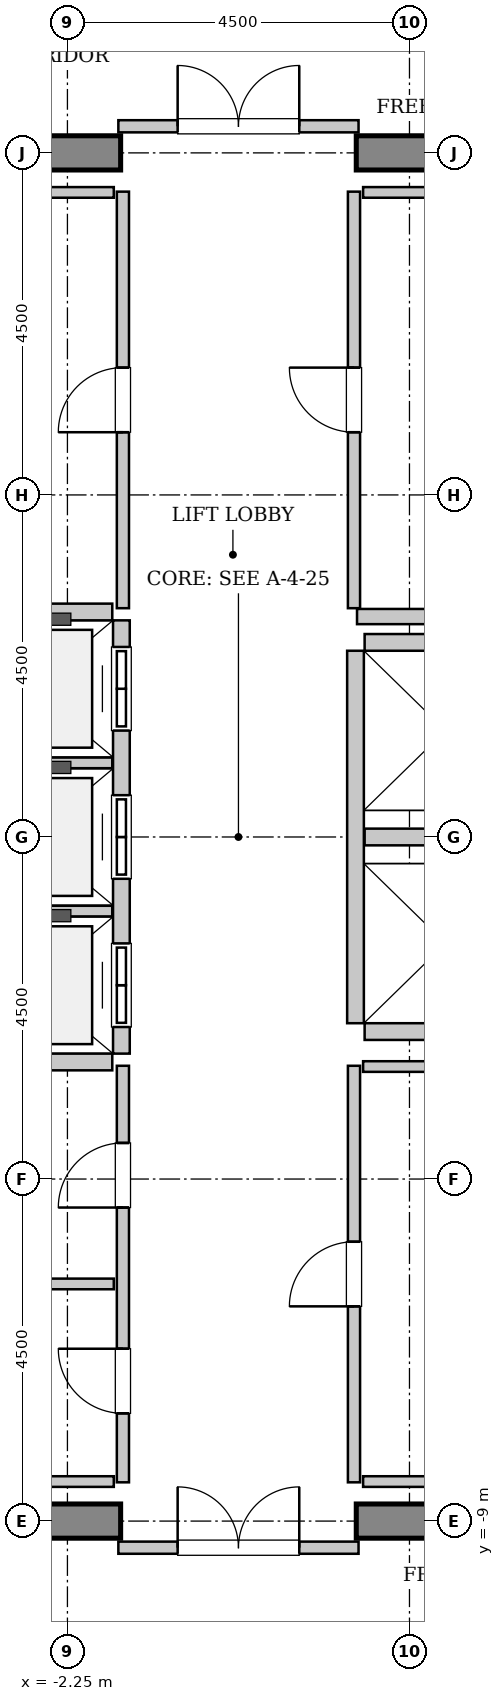
"""IFC4 building model, lengths in metres.
Left out: names, types, materials, properties, quantities, classifications, styles, units other than length and angle.
Written with IfcOpenShell. Run it as: python <this file> out.ifc"""

import sys

from ifc_helpers import new_model, si_unit, direction, frame, frame_2d, origin, place, context, subcontext, project, spatial, rectangle, extrude, source, transform, mapped, element, fill, save


model = new_model("IFC4")
c1 = context("Model", 3, precision=1e-05, world=origin(), true_north=direction((0.0, 1.0)))
c2 = subcontext(c1, "Body", "Model", "MODEL_VIEW")
j1 = project(units=[si_unit("LENGTHUNIT", "METRE"), si_unit("PLANEANGLEUNIT", "RADIAN")], contexts=[c1])
p1 = place(None, origin())
s1 = spatial("IfcSite", under=j1, at=p1, CompositionType="ELEMENT")
p2 = place(p1, origin())
s2 = spatial("IfcBuilding", under=s1, at=p2, CompositionType="ELEMENT")
p3 = place(p2, frame((0.0, 0.0, 306.4)))
s3 = spatial("IfcBuildingStorey", under=s2, at=p3, CompositionType="ELEMENT", Elevation=306.4)
m1 = source(origin(), c2, "Body", "SweptSolid", [
    extrude(rectangle(XDim=9.925, YDim=0.45, at=frame_2d((4.962, 0.0))), origin(), (0.0, 0.0, 1.0), 3.8),
])
for number, where, z_axis, x_axis in (
    (1, (-11.475, 9.0, 0.0), (0.0, 0.0, 1.0), (1.0, 0.0, 0.0)),
    (2, (1.55, 9.0, 0.0), (0.0, 0.0, 1.0), (1.0, 0.0, 0.0)),
    (3, (-11.475, -9.0, 0.0), (0.0, 0.0, 1.0), (1.0, 0.0, 0.0)),
    (4, (1.55, -9.0, 0.0), (0.0, 0.0, 1.0), (1.0, 0.0, 0.0)),
):
    element("IfcWall", number, at=place(p3, frame(where, z_axis=z_axis, x_axis=x_axis)), inside=s3, PredefinedType="SHEAR", context=c2, shape_type="MappedRepresentation", body=[
        mapped(m1, transform((0.0, 0.0, 0.0), x_axis=(1.0, 0.0, 0.0), y_axis=(0.0, 1.0, 0.0), z_axis=(0.0, 0.0, 1.0), scale=1.0)),
    ])
m2 = source(origin(), c2, "Body", "SweptSolid", [
    extrude(rectangle(XDim=5.7, YDim=0.22, at=frame_2d((2.85, 0.0))), origin(), (0.0, 0.0, 1.0), 3.535),
])
p4 = place(p3, frame((-1.54, -2.85, 0.0), z_axis=(0.0, 0.0, 1.0), x_axis=(0.0, 1.0, 0.0)))
e5 = element("IfcWall", 5, at=p4, inside=s3, PredefinedType="SOLIDWALL", context=c2, shape_type="MappedRepresentation", body=[
    mapped(m2, transform((0.0, 0.0, 0.0), x_axis=(1.0, 0.0, 0.0), y_axis=(0.0, 1.0, 0.0), z_axis=(0.0, 0.0, 1.0), scale=1.0)),
])
p5 = place(p4, frame((0.35, 0.0, 0.0)))
e6 = element("IfcOpeningElement", 6, at=p5, cuts=e5, PredefinedType="OPENING", context=c2, shape_type="SweptSolid", body=[
    extrude(rectangle(XDim=1.1, YDim=2.2, at=frame_2d((0.55, 1.1))), frame((0.0, 0.12, 0.0), z_axis=(0.0, -1.0, 0.0), x_axis=(1.0, 0.0, 0.0)), (0.0, 0.0, 1.0), 0.24),
])
p6 = place(p4, frame((2.3, 0.0, 0.0)))
e7 = element("IfcOpeningElement", 7, at=p6, cuts=e5, PredefinedType="OPENING", context=c2, shape_type="SweptSolid", body=[
    extrude(rectangle(XDim=1.1, YDim=2.2, at=frame_2d((0.55, 1.1))), frame((0.0, 0.12, 0.0), z_axis=(0.0, -1.0, 0.0), x_axis=(1.0, 0.0, 0.0)), (0.0, 0.0, 1.0), 0.24),
])
p7 = place(p4, frame((4.25, 0.0, 0.0)))
e8 = element("IfcOpeningElement", 8, at=p7, cuts=e5, PredefinedType="OPENING", context=c2, shape_type="SweptSolid", body=[
    extrude(rectangle(XDim=1.1, YDim=2.2, at=frame_2d((0.55, 1.1))), frame((0.0, 0.12, 0.0), z_axis=(0.0, -1.0, 0.0), x_axis=(1.0, 0.0, 0.0)), (0.0, 0.0, 1.0), 0.24),
])
m3 = source(origin(), c2, "Body", "SweptSolid", [
    extrude(rectangle(XDim=2.13, YDim=0.22, at=frame_2d((1.065, 0.0))), origin(), (0.0, 0.0, 1.0), 3.535),
])
p8 = place(p3, frame((-3.79, -2.96, 0.0), z_axis=(0.0, 0.0, 1.0), x_axis=(1.0, 0.0, 0.0)))
e9 = element("IfcWall", 9, at=p8, inside=s3, PredefinedType="SOLIDWALL", context=c2, shape_type="MappedRepresentation", body=[
    mapped(m3, transform((0.0, 0.0, 0.0), x_axis=(1.0, 0.0, 0.0), y_axis=(0.0, 1.0, 0.0), z_axis=(0.0, 0.0, 1.0), scale=1.0)),
])
m4 = source(origin(), c2, "Body", "SweptSolid", [
    extrude(rectangle(XDim=2.13, YDim=0.14, at=frame_2d((1.065, 0.0))), origin(), (0.0, 0.0, 1.0), 3.535),
])
for number, where, z_axis, x_axis in (
    (10, (-3.79, -0.975, 0.0), (0.0, 0.0, 1.0), (1.0, 0.0, 0.0)),
    (11, (-3.79, 0.975, 0.0), (0.0, 0.0, 1.0), (1.0, 0.0, 0.0)),
):
    element("IfcWall", number, at=place(p3, frame(where, z_axis=z_axis, x_axis=x_axis)), inside=s3, PredefinedType="PARTITIONING", context=c2, shape_type="MappedRepresentation", body=[
        mapped(m4, transform((0.0, 0.0, 0.0), x_axis=(1.0, 0.0, 0.0), y_axis=(0.0, 1.0, 0.0), z_axis=(0.0, 0.0, 1.0), scale=1.0)),
    ])
p9 = place(p3, frame((-1.66, 2.96, 0.0), z_axis=(0.0, 0.0, 1.0), x_axis=(-1.0, 0.0, 0.0)))
e12 = element("IfcWall", 12, at=p9, inside=s3, PredefinedType="SOLIDWALL", context=c2, shape_type="MappedRepresentation", body=[
    mapped(m3, transform((0.0, 0.0, 0.0), x_axis=(1.0, 0.0, 0.0), y_axis=(0.0, 1.0, 0.0), z_axis=(0.0, 0.0, 1.0), scale=1.0)),
])
m5 = source(origin(), c2, "Body", "SweptSolid", [
    extrude(rectangle(XDim=4.9, YDim=0.22, at=frame_2d((2.45, 0.0))), origin(), (0.0, 0.0, 1.0), 3.535),
])
p10 = place(p3, frame((1.54, 2.45, 0.0), z_axis=(0.0, 0.0, 1.0), x_axis=(0.0, -1.0, 0.0)))
e13 = element("IfcWall", 13, at=p10, inside=s3, PredefinedType="SOLIDWALL", context=c2, shape_type="MappedRepresentation", body=[
    mapped(m5, transform((0.0, 0.0, 0.0), x_axis=(1.0, 0.0, 0.0), y_axis=(0.0, 1.0, 0.0), z_axis=(0.0, 0.0, 1.0), scale=1.0)),
])
for number, where, z_axis, x_axis in (
    (14, (1.66, -2.56, 0.0), (0.0, 0.0, 1.0), (1.0, 0.0, 0.0)),
    (15, (1.66, 0.0, 0.0), (0.0, 0.0, 1.0), (1.0, 0.0, 0.0)),
    (16, (3.79, 2.56, 0.0), (0.0, 0.0, 1.0), (-1.0, 0.0, 0.0)),
):
    element("IfcWall", number, at=place(p3, frame(where, z_axis=z_axis, x_axis=x_axis)), inside=s3, PredefinedType="SOLIDWALL", context=c2, shape_type="MappedRepresentation", body=[
        mapped(m3, transform((0.0, 0.0, 0.0), x_axis=(1.0, 0.0, 0.0), y_axis=(0.0, 1.0, 0.0), z_axis=(0.0, 0.0, 1.0), scale=1.0)),
    ])
m6 = source(origin(), c2, "Body", "SweptSolid", [
    extrude(rectangle(XDim=2.52, YDim=0.2, at=frame_2d((1.26, 0.0))), origin(), (0.0, 0.0, 1.0), 3.535),
])
p11 = place(p3, frame((1.56, 2.9, 0.0), z_axis=(0.0, 0.0, 1.0), x_axis=(1.0, 0.0, 0.0)))
e17 = element("IfcWall", 17, at=p11, inside=s3, PredefinedType="PARTITIONING", context=c2, shape_type="MappedRepresentation", body=[
    mapped(m6, transform((0.0, 0.0, 0.0), x_axis=(1.0, 0.0, 0.0), y_axis=(0.0, 1.0, 0.0), z_axis=(0.0, 0.0, 1.0), scale=1.0)),
])
m7 = source(origin(), c2, "Body", "SweptSolid", [
    extrude(rectangle(XDim=3.16, YDim=0.16, at=frame_2d((1.58, 0.0))), origin(), (0.0, 0.0, 1.0), 2.625),
])
p12 = place(p3, frame((-1.58, 9.35, 0.0), z_axis=(0.0, 0.0, 1.0), x_axis=(1.0, 0.0, 0.0)))
e18 = element("IfcWall", 18, at=p12, inside=s3, PredefinedType="PARTITIONING", context=c2, shape_type="MappedRepresentation", body=[
    mapped(m7, transform((0.0, 0.0, 0.0), x_axis=(1.0, 0.0, 0.0), y_axis=(0.0, 1.0, 0.0), z_axis=(0.0, 0.0, 1.0), scale=1.0)),
])
p13 = place(p12, frame((0.78, 0.0, 0.0)))
e19 = element("IfcOpeningElement", 19, at=p13, cuts=e18, PredefinedType="OPENING", context=c2, shape_type="SweptSolid", body=[
    extrude(rectangle(XDim=1.6, YDim=2.3, at=frame_2d((0.8, 1.15))), frame((0.0, 0.09, 0.0), z_axis=(0.0, -1.0, 0.0), x_axis=(1.0, 0.0, 0.0)), (0.0, 0.0, 1.0), 0.18),
])
p14 = place(p3, frame((-1.58, -9.35, 0.0), z_axis=(0.0, 0.0, 1.0), x_axis=(1.0, 0.0, 0.0)))
e20 = element("IfcWall", 20, at=p14, inside=s3, PredefinedType="PARTITIONING", context=c2, shape_type="MappedRepresentation", body=[
    mapped(m7, transform((0.0, 0.0, 0.0), x_axis=(1.0, 0.0, 0.0), y_axis=(0.0, 1.0, 0.0), z_axis=(0.0, 0.0, 1.0), scale=1.0)),
])
p15 = place(p14, frame((0.78, 0.0, 0.0)))
e21 = element("IfcOpeningElement", 21, at=p15, cuts=e20, PredefinedType="OPENING", context=c2, shape_type="SweptSolid", body=[
    extrude(rectangle(XDim=1.6, YDim=2.3, at=frame_2d((0.8, 1.15))), frame((0.0, 0.09, 0.0), z_axis=(0.0, -1.0, 0.0), x_axis=(1.0, 0.0, 0.0)), (0.0, 0.0, 1.0), 0.18),
])
m8 = source(origin(), c2, "Body", "SweptSolid", [
    extrude(rectangle(XDim=5.48, YDim=0.16, at=frame_2d((2.74, 0.0))), origin(), (0.0, 0.0, 1.0), 3.535),
])
p16 = place(p3, frame((-1.52, 3.01, 0.0), z_axis=(0.0, 0.0, 1.0), x_axis=(0.0, 1.0, 0.0)))
e22 = element("IfcWall", 22, at=p16, inside=s3, PredefinedType="PARTITIONING", context=c2, shape_type="MappedRepresentation", body=[
    mapped(m8, transform((0.0, 0.0, 0.0), x_axis=(1.0, 0.0, 0.0), y_axis=(0.0, 1.0, 0.0), z_axis=(0.0, 0.0, 1.0), scale=1.0)),
])
p17 = place(p16, frame((2.315, 0.0, 0.0)))
e23 = element("IfcOpeningElement", 23, at=p17, cuts=e22, PredefinedType="OPENING", context=c2, shape_type="SweptSolid", body=[
    extrude(rectangle(XDim=0.85, YDim=2.1, at=frame_2d((0.425, 1.05))), frame((0.0, 0.09, 0.0), z_axis=(0.0, -1.0, 0.0), x_axis=(1.0, 0.0, 0.0)), (0.0, 0.0, 1.0), 0.18),
])
m9 = source(origin(), c2, "Body", "SweptSolid", [
    extrude(rectangle(XDim=3.15, YDim=0.14, at=frame_2d((1.575, 0.0))), origin(), (0.0, 0.0, 1.0), 3.535),
])
p18 = place(p3, frame((-4.79, 8.48, 0.0), z_axis=(0.0, 0.0, 1.0), x_axis=(1.0, 0.0, 0.0)))
e24 = element("IfcWall", 24, at=p18, inside=s3, PredefinedType="PARTITIONING", context=c2, shape_type="MappedRepresentation", body=[
    mapped(m9, transform((0.0, 0.0, 0.0), x_axis=(1.0, 0.0, 0.0), y_axis=(0.0, 1.0, 0.0), z_axis=(0.0, 0.0, 1.0), scale=1.0)),
])
p19 = place(p3, frame((-1.52, -8.49, 0.0), z_axis=(0.0, 0.0, 1.0), x_axis=(0.0, 1.0, 0.0)))
e25 = element("IfcWall", 25, at=p19, inside=s3, PredefinedType="PARTITIONING", context=c2, shape_type="MappedRepresentation", body=[
    mapped(m8, transform((0.0, 0.0, 0.0), x_axis=(1.0, 0.0, 0.0), y_axis=(0.0, 1.0, 0.0), z_axis=(0.0, 0.0, 1.0), scale=1.0)),
])
p20 = place(p19, frame((0.907, 0.0, 0.0)))
e26 = element("IfcOpeningElement", 26, at=p20, cuts=e25, PredefinedType="OPENING", context=c2, shape_type="SweptSolid", body=[
    extrude(rectangle(XDim=0.85, YDim=2.1, at=frame_2d((0.425, 1.05))), frame((0.0, 0.09, 0.0), z_axis=(0.0, -1.0, 0.0), x_axis=(1.0, 0.0, 0.0)), (0.0, 0.0, 1.0), 0.18),
])
p21 = place(p19, frame((3.615, 0.0, 0.0)))
e27 = element("IfcOpeningElement", 27, at=p21, cuts=e25, PredefinedType="OPENING", context=c2, shape_type="SweptSolid", body=[
    extrude(rectangle(XDim=0.85, YDim=2.1, at=frame_2d((0.425, 1.05))), frame((0.0, 0.09, 0.0), z_axis=(0.0, -1.0, 0.0), x_axis=(1.0, 0.0, 0.0)), (0.0, 0.0, 1.0), 0.18),
])
m10 = source(origin(), c2, "Body", "SweptSolid", [
    extrude(rectangle(XDim=5.55, YDim=0.14, at=frame_2d((2.775, 0.0))), origin(), (0.0, 0.0, 1.0), 3.535),
])
p22 = place(p3, frame((-7.19, -5.88, 0.0), z_axis=(0.0, 0.0, 1.0), x_axis=(1.0, 0.0, 0.0)))
e28 = element("IfcWall", 28, at=p22, inside=s3, PredefinedType="PARTITIONING", context=c2, shape_type="MappedRepresentation", body=[
    mapped(m10, transform((0.0, 0.0, 0.0), x_axis=(1.0, 0.0, 0.0), y_axis=(0.0, 1.0, 0.0), z_axis=(0.0, 0.0, 1.0), scale=1.0)),
])
p23 = place(p3, frame((1.52, 3.01, 0.0), z_axis=(0.0, 0.0, 1.0), x_axis=(0.0, 1.0, 0.0)))
e29 = element("IfcWall", 29, at=p23, inside=s3, PredefinedType="PARTITIONING", context=c2, shape_type="MappedRepresentation", body=[
    mapped(m8, transform((0.0, 0.0, 0.0), x_axis=(1.0, 0.0, 0.0), y_axis=(0.0, 1.0, 0.0), z_axis=(0.0, 0.0, 1.0), scale=1.0)),
])
p24 = place(p23, frame((2.315, 0.0, 0.0)))
e30 = element("IfcOpeningElement", 30, at=p24, cuts=e29, PredefinedType="OPENING", context=c2, shape_type="SweptSolid", body=[
    extrude(rectangle(XDim=0.85, YDim=2.1, at=frame_2d((0.425, 1.05))), frame((0.0, 0.09, 0.0), z_axis=(0.0, -1.0, 0.0), x_axis=(1.0, 0.0, 0.0)), (0.0, 0.0, 1.0), 0.18),
])
for number, where, z_axis, x_axis in (
    (31, (1.64, 8.48, 0.0), (0.0, 0.0, 1.0), (1.0, 0.0, 0.0)),
    (32, (-4.79, -8.48, 0.0), (0.0, 0.0, 1.0), (1.0, 0.0, 0.0)),
):
    element("IfcWall", number, at=place(p3, frame(where, z_axis=z_axis, x_axis=x_axis)), inside=s3, PredefinedType="PARTITIONING", context=c2, shape_type="MappedRepresentation", body=[
        mapped(m9, transform((0.0, 0.0, 0.0), x_axis=(1.0, 0.0, 0.0), y_axis=(0.0, 1.0, 0.0), z_axis=(0.0, 0.0, 1.0), scale=1.0)),
    ])
p25 = place(p3, frame((1.52, -8.49, 0.0), z_axis=(0.0, 0.0, 1.0), x_axis=(0.0, 1.0, 0.0)))
e33 = element("IfcWall", 33, at=p25, inside=s3, PredefinedType="PARTITIONING", context=c2, shape_type="MappedRepresentation", body=[
    mapped(m8, transform((0.0, 0.0, 0.0), x_axis=(1.0, 0.0, 0.0), y_axis=(0.0, 1.0, 0.0), z_axis=(0.0, 0.0, 1.0), scale=1.0)),
])
p26 = place(p25, frame((2.315, 0.0, 0.0)))
e34 = element("IfcOpeningElement", 34, at=p26, cuts=e33, PredefinedType="OPENING", context=c2, shape_type="SweptSolid", body=[
    extrude(rectangle(XDim=0.85, YDim=2.1, at=frame_2d((0.425, 1.05))), frame((0.0, 0.09, 0.0), z_axis=(0.0, -1.0, 0.0), x_axis=(1.0, 0.0, 0.0)), (0.0, 0.0, 1.0), 0.18),
])
for number, where, z_axis, x_axis in (
    (35, (1.64, -3.02, 0.0), (0.0, 0.0, 1.0), (1.0, 0.0, 0.0)),
    (36, (1.64, -8.48, 0.0), (0.0, 0.0, 1.0), (1.0, 0.0, 0.0)),
):
    element("IfcWall", number, at=place(p3, frame(where, z_axis=z_axis, x_axis=x_axis)), inside=s3, PredefinedType="PARTITIONING", context=c2, shape_type="MappedRepresentation", body=[
        mapped(m9, transform((0.0, 0.0, 0.0), x_axis=(1.0, 0.0, 0.0), y_axis=(0.0, 1.0, 0.0), z_axis=(0.0, 0.0, 1.0), scale=1.0)),
    ])
m11 = source(origin(), c2, "Body", "SweptSolid", [
    extrude(rectangle(XDim=1.1, YDim=2.2, at=frame_2d((0.55, 1.1))), frame((0.0, 0.025, 0.0), z_axis=(0.0, -1.0, 0.0), x_axis=(1.0, 0.0, 0.0)), (0.0, 0.0, 1.0), 0.05),
])
p27 = place(p5, origin())
e37 = element("IfcDoor", 37, at=p27, inside=s3, OperationType="DOUBLE_DOOR_SLIDING", PredefinedType="DOOR", context=c2, shape_type="MappedRepresentation", body=[
    mapped(m11, transform((0.0, 0.0, 0.0), x_axis=(1.0, 0.0, 0.0), y_axis=(0.0, 1.0, 0.0), z_axis=(0.0, 0.0, 1.0), scale=1.0)),
])
fill(e6, e37)
p28 = place(p6, origin())
e38 = element("IfcDoor", 38, at=p28, inside=s3, OperationType="DOUBLE_DOOR_SLIDING", PredefinedType="DOOR", context=c2, shape_type="MappedRepresentation", body=[
    mapped(m11, transform((0.0, 0.0, 0.0), x_axis=(1.0, 0.0, 0.0), y_axis=(0.0, 1.0, 0.0), z_axis=(0.0, 0.0, 1.0), scale=1.0)),
])
fill(e7, e38)
p29 = place(p7, origin())
e39 = element("IfcDoor", 39, at=p29, inside=s3, OperationType="DOUBLE_DOOR_SLIDING", PredefinedType="DOOR", context=c2, shape_type="MappedRepresentation", body=[
    mapped(m11, transform((0.0, 0.0, 0.0), x_axis=(1.0, 0.0, 0.0), y_axis=(0.0, 1.0, 0.0), z_axis=(0.0, 0.0, 1.0), scale=1.0)),
])
fill(e8, e39)
m12 = source(origin(), c2, "Body", "SweptSolid", [
    extrude(rectangle(XDim=1.6, YDim=2.3, at=frame_2d((0.8, 1.15))), frame((0.0, 0.025, 0.0), z_axis=(0.0, -1.0, 0.0), x_axis=(1.0, 0.0, 0.0)), (0.0, 0.0, 1.0), 0.05),
])
p30 = place(p13, origin())
e40 = element("IfcDoor", 40, at=p30, inside=s3, OperationType="DOUBLE_DOOR_SINGLE_SWING", PredefinedType="DOOR", context=c2, shape_type="MappedRepresentation", body=[
    mapped(m12, transform((0.0, 0.0, 0.0), x_axis=(1.0, 0.0, 0.0), y_axis=(0.0, 1.0, 0.0), z_axis=(0.0, 0.0, 1.0), scale=1.0)),
])
fill(e19, e40)
p31 = place(p15, origin())
e41 = element("IfcDoor", 41, at=p31, inside=s3, OperationType="DOUBLE_DOOR_SINGLE_SWING", PredefinedType="DOOR", context=c2, shape_type="MappedRepresentation", body=[
    mapped(m12, transform((0.0, 0.0, 0.0), x_axis=(1.0, 0.0, 0.0), y_axis=(0.0, 1.0, 0.0), z_axis=(0.0, 0.0, 1.0), scale=1.0)),
])
fill(e21, e41)
m13 = source(origin(), c2, "Body", "SweptSolid", [
    extrude(rectangle(XDim=0.85, YDim=2.1, at=frame_2d((0.425, 1.05))), frame((0.0, 0.025, 0.0), z_axis=(0.0, -1.0, 0.0), x_axis=(1.0, 0.0, 0.0)), (0.0, 0.0, 1.0), 0.05),
])
p32 = place(p17, origin())
e42 = element("IfcDoor", 42, at=p32, inside=s3, OperationType="SINGLE_SWING_LEFT", PredefinedType="DOOR", context=c2, shape_type="MappedRepresentation", body=[
    mapped(m13, transform((0.0, 0.0, 0.0), x_axis=(1.0, 0.0, 0.0), y_axis=(0.0, 1.0, 0.0), z_axis=(0.0, 0.0, 1.0), scale=1.0)),
])
fill(e23, e42)
p33 = place(p20, origin())
e43 = element("IfcDoor", 43, at=p33, inside=s3, OperationType="SINGLE_SWING_RIGHT", PredefinedType="DOOR", context=c2, shape_type="MappedRepresentation", body=[
    mapped(m13, transform((0.0, 0.0, 0.0), x_axis=(1.0, 0.0, 0.0), y_axis=(0.0, 1.0, 0.0), z_axis=(0.0, 0.0, 1.0), scale=1.0)),
])
fill(e26, e43)
p34 = place(p21, origin())
e44 = element("IfcDoor", 44, at=p34, inside=s3, OperationType="SINGLE_SWING_LEFT", PredefinedType="DOOR", context=c2, shape_type="MappedRepresentation", body=[
    mapped(m13, transform((0.0, 0.0, 0.0), x_axis=(1.0, 0.0, 0.0), y_axis=(0.0, 1.0, 0.0), z_axis=(0.0, 0.0, 1.0), scale=1.0)),
])
fill(e27, e44)
p35 = place(p24, origin())
e45 = element("IfcDoor", 45, at=p35, inside=s3, OperationType="SINGLE_SWING_RIGHT", PredefinedType="DOOR", context=c2, shape_type="MappedRepresentation", body=[
    mapped(m13, transform((0.0, 0.0, 0.0), x_axis=(1.0, 0.0, 0.0), y_axis=(0.0, 1.0, 0.0), z_axis=(0.0, 0.0, 1.0), scale=1.0)),
])
fill(e30, e45)
p36 = place(p26, origin())
e46 = element("IfcDoor", 46, at=p36, inside=s3, OperationType="SINGLE_SWING_LEFT", PredefinedType="DOOR", context=c2, shape_type="MappedRepresentation", body=[
    mapped(m13, transform((0.0, 0.0, 0.0), x_axis=(1.0, 0.0, 0.0), y_axis=(0.0, 1.0, 0.0), z_axis=(0.0, 0.0, 1.0), scale=1.0)),
])
fill(e34, e46)
save(model, sys.argv[1])
